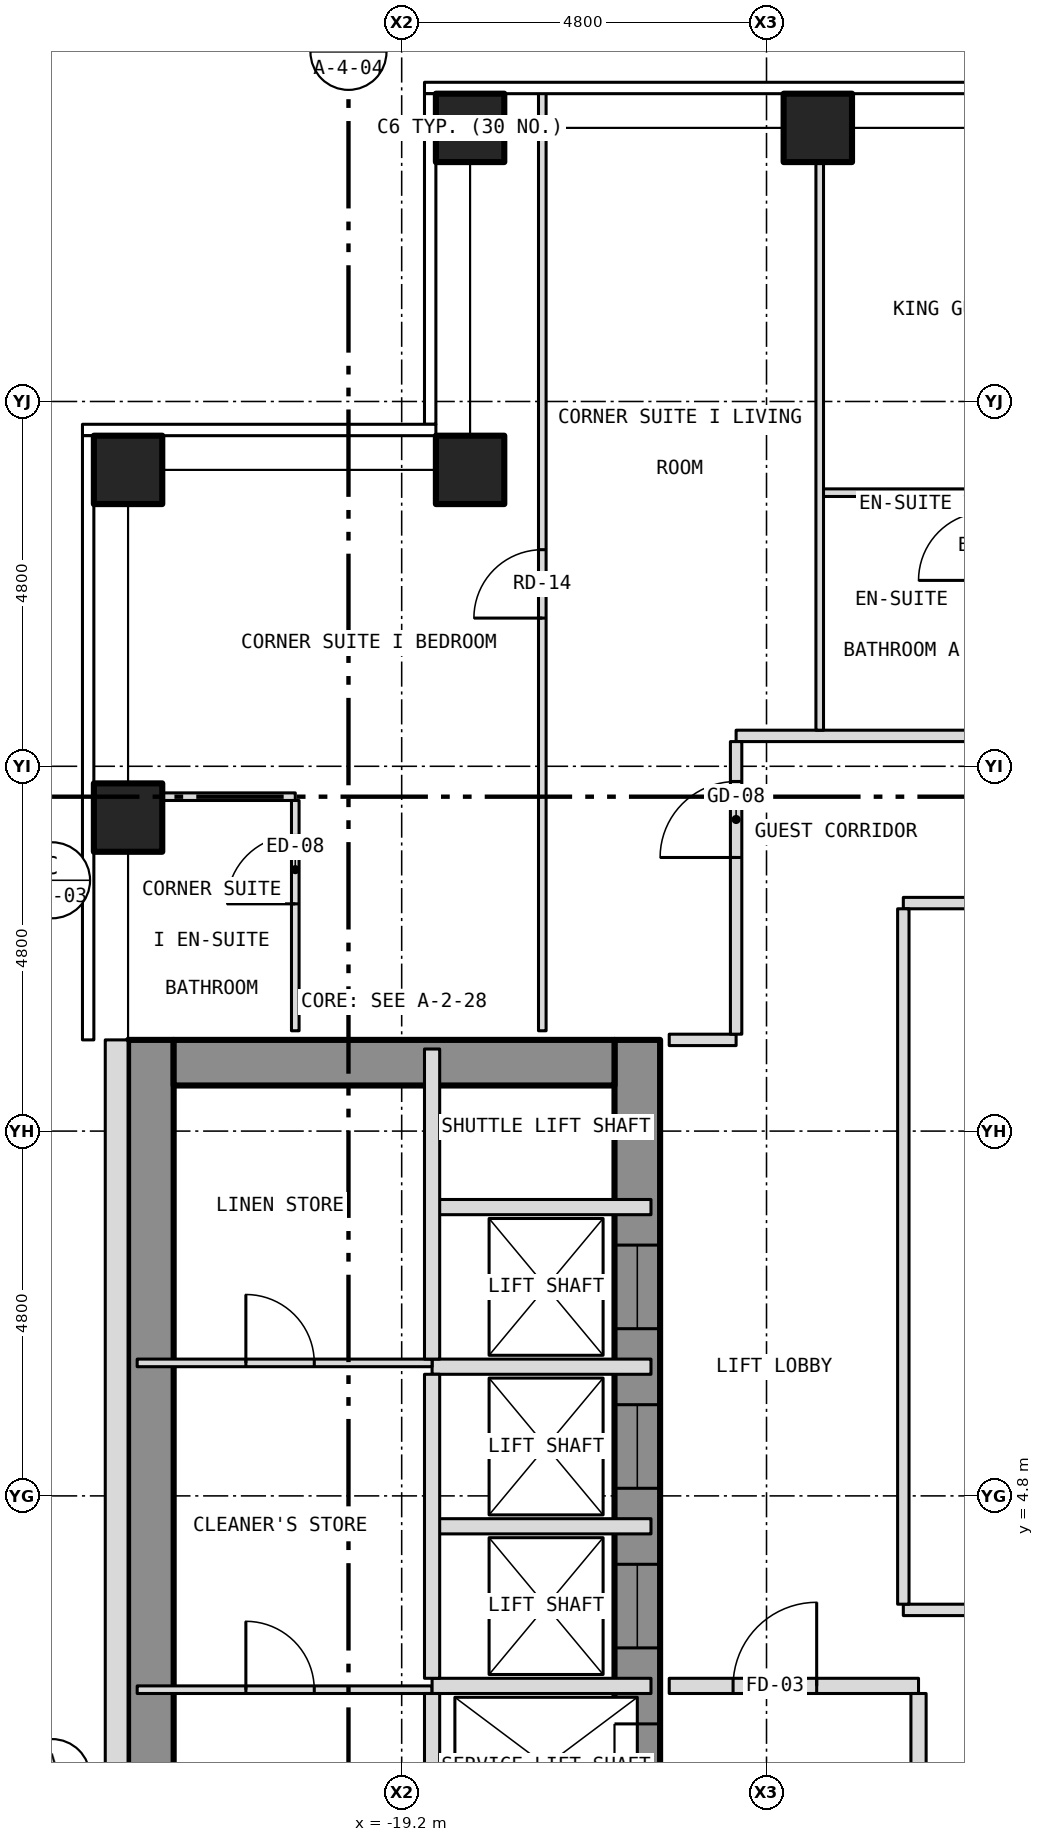
"""IFC4 building model, lengths in metres.
Left out: names, types, materials, properties, quantities, classifications, styles, units other than length and angle.
Written with IfcOpenShell. Run it as: python <this file> out.ifc"""

import sys

from ifc_helpers import new_model, si_unit, direction, frame, frame_2d, origin, origin_2d, place, context, subcontext, project, spatial, rectangle, hollow_rectangle, extrude, element, fill, save


model = new_model("IFC4")
c1 = context("Model", 3, precision=1e-05, world=origin(), true_north=direction((0.0, 1.0)))
c2 = subcontext(c1, "Body", "Model", "MODEL_VIEW")
j1 = project(units=[si_unit("LENGTHUNIT", "METRE"), si_unit("PLANEANGLEUNIT", "RADIAN")], contexts=[c1])
p1 = place(None, origin())
s1 = spatial("IfcSite", under=j1, at=p1, CompositionType="ELEMENT")
p2 = place(p1, origin())
s2 = spatial("IfcBuilding", under=s1, at=p2, CompositionType="ELEMENT")
p3 = place(p2, frame((0.0, 0.0, 103.0)))
s3 = spatial("IfcBuildingStorey", under=s2, at=p3, CompositionType="ELEMENT", Elevation=103.0)
for number, where, z_axis, x_axis in (
    (1, (-18.3, 22.8, -0.15), (0.0, 0.0, 1.0), (1.0, 0.0, 0.0)),
    (2, (-13.725, 22.8, -0.15), (0.0, 0.0, 1.0), (1.0, 0.0, 0.0)),
    (3, (-22.8, 13.725, -0.15), (0.0, 0.0, 1.0), (1.0, 0.0, 0.0)),
    (4, (-22.8, 18.3, -0.15), (0.0, 0.0, 1.0), (1.0, 0.0, 0.0)),
    (5, (-18.3, 18.3, -0.15), (0.0, 0.0, 1.0), (1.0, 0.0, 0.0)),
):
    element("IfcColumn", number, at=place(p3, frame(where, z_axis=z_axis, x_axis=x_axis)), inside=s3, PredefinedType="COLUMN", context=c2, shape_type="SweptSolid", body=[
        extrude(hollow_rectangle(XDim=0.9, YDim=0.9, WallThickness=0.05, at=origin_2d()), origin(), (0.0, 0.0, 1.0), 3.5),
    ])
p4 = place(p3, frame((-16.1, -10.8, 0.0), z_axis=(0.0, 0.0, 1.0), x_axis=(0.0, 1.0, 0.0)))
e6 = element("IfcWall", 6, at=p4, inside=s3, PredefinedType="SHEAR", context=c2, shape_type="SweptSolid", body=[
    extrude(rectangle(XDim=21.6, YDim=0.6, at=frame_2d((10.8, 0.0))), origin(), (0.0, 0.0, 1.0), 3.25),
])
p5 = place(p4, frame((9.4, 0.0, 0.0)))
e7 = element("IfcOpeningElement", 7, at=p5, cuts=e6, PredefinedType="OPENING", context=c2, shape_type="SweptSolid", body=[
    extrude(rectangle(XDim=1.1, YDim=2.1, at=frame_2d((0.55, 1.05))), frame((0.0, 0.312, 0.0), z_axis=(0.0, -1.0, 0.0), x_axis=(1.0, 0.0, 0.0)), (0.0, 0.0, 1.0), 0.624),
])
p6 = place(p4, frame((11.5, 0.0, 0.0)))
e8 = element("IfcOpeningElement", 8, at=p6, cuts=e6, PredefinedType="OPENING", context=c2, shape_type="SweptSolid", body=[
    extrude(rectangle(XDim=1.1, YDim=2.1, at=frame_2d((0.55, 1.05))), frame((0.0, 0.312, 0.0), z_axis=(0.0, -1.0, 0.0), x_axis=(1.0, 0.0, 0.0)), (0.0, 0.0, 1.0), 0.624),
])
p7 = place(p4, frame((13.6, 0.0, 0.0)))
e9 = element("IfcOpeningElement", 9, at=p7, cuts=e6, PredefinedType="OPENING", context=c2, shape_type="SweptSolid", body=[
    extrude(rectangle(XDim=1.1, YDim=2.1, at=frame_2d((0.55, 1.05))), frame((0.0, 0.312, 0.0), z_axis=(0.0, -1.0, 0.0), x_axis=(1.0, 0.0, 0.0)), (0.0, 0.0, 1.0), 0.624),
])
p8 = place(p4, frame((15.7, 0.0, 0.0)))
e10 = element("IfcOpeningElement", 10, at=p8, cuts=e6, PredefinedType="OPENING", context=c2, shape_type="SweptSolid", body=[
    extrude(rectangle(XDim=1.1, YDim=2.1, at=frame_2d((0.55, 1.05))), frame((0.0, 0.312, 0.0), z_axis=(0.0, -1.0, 0.0), x_axis=(1.0, 0.0, 0.0)), (0.0, 0.0, 1.0), 0.624),
])
p9 = place(p4, frame((17.8, 0.0, 0.0)))
e11 = element("IfcOpeningElement", 11, at=p9, cuts=e6, PredefinedType="OPENING", context=c2, shape_type="SweptSolid", body=[
    extrude(rectangle(XDim=1.1, YDim=2.1, at=frame_2d((0.55, 1.05))), frame((0.0, 0.312, 0.0), z_axis=(0.0, -1.0, 0.0), x_axis=(1.0, 0.0, 0.0)), (0.0, 0.0, 1.0), 0.624),
])
p10 = place(p4, frame((0.758, 0.0, 0.0)))
e12 = element("IfcOpeningElement", 12, at=p10, cuts=e6, PredefinedType="OPENING", context=c2, shape_type="SweptSolid", body=[
    extrude(rectangle(XDim=1.1, YDim=2.1, at=frame_2d((0.55, 1.05))), frame((0.0, 0.312, 0.0), z_axis=(0.0, -1.0, 0.0), x_axis=(1.0, 0.0, 0.0)), (0.0, 0.0, 1.0), 0.624),
])
p11 = place(p4, frame((7.5, 0.0, 0.0)))
e13 = element("IfcOpeningElement", 13, at=p11, cuts=e6, PredefinedType="OPENING", context=c2, shape_type="SweptSolid", body=[
    extrude(rectangle(XDim=1.1, YDim=2.1, at=frame_2d((0.55, 1.05))), frame((0.0, 0.312, 0.0), z_axis=(0.0, -1.0, 0.0), x_axis=(1.0, 0.0, 0.0)), (0.0, 0.0, 1.0), 0.624),
])
p12 = place(p3, frame((-22.5, -10.8, 0.0), z_axis=(0.0, 0.0, 1.0), x_axis=(0.0, 1.0, 0.0)))
e14 = element("IfcWall", 14, at=p12, inside=s3, PredefinedType="SHEAR", context=c2, shape_type="SweptSolid", body=[
    extrude(rectangle(XDim=21.6, YDim=0.6, at=frame_2d((10.8, 0.0))), origin(), (0.0, 0.0, 1.0), 3.25),
])
p13 = place(p3, frame((-22.2, 10.5, 0.0), z_axis=(0.0, 0.0, 1.0), x_axis=(1.0, 0.0, 0.0)))
e15 = element("IfcWall", 15, at=p13, inside=s3, PredefinedType="SHEAR", context=c2, shape_type="SweptSolid", body=[
    extrude(rectangle(XDim=5.8, YDim=0.6, at=frame_2d((2.9, 0.0))), origin(), (0.0, 0.0, 1.0), 3.25),
])
p14 = place(p3, frame((-22.95, 10.8, 0.0), z_axis=(0.0, 0.0, 1.0), x_axis=(0.0, -1.0, 0.0)))
e16 = element("IfcWall", 16, at=p14, inside=s3, PredefinedType="SOLIDWALL", context=c2, shape_type="SweptSolid", body=[
    extrude(rectangle(XDim=21.6, YDim=0.3, at=frame_2d((10.8, 0.0))), origin(), (0.0, 0.0, 1.0), 3.5),
])
p15 = place(p14, frame((18.05, 0.0, 1.0)))
e17 = element("IfcOpeningElement", 17, at=p15, cuts=e16, PredefinedType="OPENING", context=c2, shape_type="SweptSolid", body=[
    extrude(rectangle(XDim=0.6, YDim=1.5, at=frame_2d((0.3, 0.75))), frame((0.0, 0.162, 0.0), z_axis=(0.0, -1.0, 0.0), x_axis=(1.0, 0.0, 0.0)), (0.0, 0.0, 1.0), 0.324),
])
p16 = place(p3, frame((-22.68, 2.25, 0.0), z_axis=(0.0, 0.0, 1.0), x_axis=(1.0, 0.0, 0.0)))
e18 = element("IfcWall", 18, at=p16, inside=s3, PredefinedType="PARTITIONING", context=c2, shape_type="SweptSolid", body=[
    extrude(rectangle(XDim=3.88, YDim=0.1, at=frame_2d((1.94, 0.0))), origin(), (0.0, 0.0, 1.0), 3.25),
])
p17 = place(p16, frame((1.43, 0.0, 0.0)))
e19 = element("IfcOpeningElement", 19, at=p17, cuts=e18, PredefinedType="OPENING", context=c2, shape_type="SweptSolid", body=[
    extrude(rectangle(XDim=0.9, YDim=2.1, at=frame_2d((0.45, 1.05))), frame((0.0, 0.062, 0.0), z_axis=(0.0, -1.0, 0.0), x_axis=(1.0, 0.0, 0.0)), (0.0, 0.0, 1.0), 0.124),
])
p18 = place(p3, frame((-18.8, 2.3, 0.0), z_axis=(0.0, 0.0, 1.0), x_axis=(1.0, 0.0, 0.0)))
e20 = element("IfcWall", 20, at=p18, inside=s3, PredefinedType="PARTITIONING", context=c2, shape_type="SweptSolid", body=[
    extrude(rectangle(XDim=2.88, YDim=0.2, at=frame_2d((1.44, 0.0))), origin(), (0.0, 0.0, 1.0), 3.25),
])
p19 = place(p3, frame((-15.68, 2.3, 0.0), z_axis=(0.0, 0.0, 1.0), x_axis=(1.0, 0.0, 0.0)))
e21 = element("IfcWall", 21, at=p19, inside=s3, PredefinedType="PARTITIONING", context=c2, shape_type="SweptSolid", body=[
    extrude(rectangle(XDim=3.28, YDim=0.2, at=frame_2d((1.64, 0.0))), origin(), (0.0, 0.0, 1.0), 3.35),
])
p20 = place(p19, frame((0.84, 0.0, 0.0)))
e22 = element("IfcOpeningElement", 22, at=p20, cuts=e21, PredefinedType="OPENING", context=c2, shape_type="SweptSolid", body=[
    extrude(rectangle(XDim=1.1, YDim=2.1, at=frame_2d((0.55, 1.05))), frame((0.0, 0.112, 0.0), z_axis=(0.0, -1.0, 0.0), x_axis=(1.0, 0.0, 0.0)), (0.0, 0.0, 1.0), 0.224),
])
p21 = place(p3, frame((-12.6, 3.3, 0.0), z_axis=(0.0, 0.0, 1.0), x_axis=(1.0, 0.0, 0.0)))
e23 = element("IfcWall", 23, at=p21, inside=s3, PredefinedType="PARTITIONING", context=c2, shape_type="SweptSolid", body=[
    extrude(rectangle(XDim=25.2, YDim=0.15, at=frame_2d((12.6, 0.0))), origin(), (0.0, 0.0, 1.0), 3.35),
])
for number, where, z_axis, x_axis in (
    (24, (-18.8, 4.4, 0.0), (0.0, 0.0, 1.0), (1.0, 0.0, 0.0)),
    (25, (-18.8, 6.5, 0.0), (0.0, 0.0, 1.0), (1.0, 0.0, 0.0)),
):
    element("IfcWall", number, at=place(p3, frame(where, z_axis=z_axis, x_axis=x_axis)), inside=s3, PredefinedType="PARTITIONING", context=c2, shape_type="SweptSolid", body=[
        extrude(rectangle(XDim=2.88, YDim=0.2, at=frame_2d((1.44, 0.0))), origin(), (0.0, 0.0, 1.0), 3.25),
    ])
p22 = place(p3, frame((-22.68, 6.55, 0.0), z_axis=(0.0, 0.0, 1.0), x_axis=(1.0, 0.0, 0.0)))
e26 = element("IfcWall", 26, at=p22, inside=s3, PredefinedType="PARTITIONING", context=c2, shape_type="SweptSolid", body=[
    extrude(rectangle(XDim=3.88, YDim=0.1, at=frame_2d((1.94, 0.0))), origin(), (0.0, 0.0, 1.0), 3.25),
])
p23 = place(p22, frame((1.43, 0.0, 0.0)))
e27 = element("IfcOpeningElement", 27, at=p23, cuts=e26, PredefinedType="OPENING", context=c2, shape_type="SweptSolid", body=[
    extrude(rectangle(XDim=0.9, YDim=2.1, at=frame_2d((0.45, 1.05))), frame((0.0, 0.062, 0.0), z_axis=(0.0, -1.0, 0.0), x_axis=(1.0, 0.0, 0.0)), (0.0, 0.0, 1.0), 0.124),
])
p24 = place(p3, frame((-18.8, 8.6, 0.0), z_axis=(0.0, 0.0, 1.0), x_axis=(1.0, 0.0, 0.0)))
e28 = element("IfcWall", 28, at=p24, inside=s3, PredefinedType="PARTITIONING", context=c2, shape_type="SweptSolid", body=[
    extrude(rectangle(XDim=2.88, YDim=0.2, at=frame_2d((1.44, 0.0))), origin(), (0.0, 0.0, 1.0), 3.25),
])
p25 = place(p3, frame((-15.68, 10.8, 0.0), z_axis=(0.0, 0.0, 1.0), x_axis=(1.0, 0.0, 0.0)))
e29 = element("IfcWall", 29, at=p25, inside=s3, PredefinedType="PARTITIONING", context=c2, shape_type="SweptSolid", body=[
    extrude(rectangle(XDim=0.88, YDim=0.15, at=frame_2d((0.44, 0.0))), origin(), (0.0, 0.0, 1.0), 3.35),
])
p26 = place(p3, frame((-12.6, 12.6, 0.0), z_axis=(0.0, 0.0, 1.0), x_axis=(1.0, 0.0, 0.0)))
e30 = element("IfcWall", 30, at=p26, inside=s3, PredefinedType="PARTITIONING", context=c2, shape_type="SweptSolid", body=[
    extrude(rectangle(XDim=25.2, YDim=0.15, at=frame_2d((12.6, 0.0))), origin(), (0.0, 0.0, 1.0), 3.35),
])
p27 = place(p26, frame((5.85, 0.0, 0.0)))
e31 = element("IfcOpeningElement", 31, at=p27, cuts=e30, PredefinedType="OPENING", context=c2, shape_type="SweptSolid", body=[
    extrude(rectangle(XDim=0.9, YDim=2.1, at=frame_2d((0.45, 1.05))), frame((0.0, 0.087, 0.0), z_axis=(0.0, -1.0, 0.0), x_axis=(1.0, 0.0, 0.0)), (0.0, 0.0, 1.0), 0.174),
])
p28 = place(p26, frame((18.45, 0.0, 0.0)))
e32 = element("IfcOpeningElement", 32, at=p28, cuts=e30, PredefinedType="OPENING", context=c2, shape_type="SweptSolid", body=[
    extrude(rectangle(XDim=0.9, YDim=2.1, at=frame_2d((0.45, 1.05))), frame((0.0, 0.087, 0.0), z_axis=(0.0, -1.0, 0.0), x_axis=(1.0, 0.0, 0.0)), (0.0, 0.0, 1.0), 0.174),
])
p29 = place(p3, frame((-22.68, 14.0, 0.0), z_axis=(0.0, 0.0, 1.0), x_axis=(1.0, 0.0, 0.0)))
e33 = element("IfcWall", 33, at=p29, inside=s3, PredefinedType="PARTITIONING", context=c2, shape_type="SweptSolid", body=[
    extrude(rectangle(XDim=2.08, YDim=0.1, at=frame_2d((1.04, 0.0))), origin(), (0.0, 0.0, 1.0), 3.35),
])
p30 = place(p3, frame((-14.8, 14.8, 0.0), z_axis=(0.0, 0.0, 1.0), x_axis=(1.0, 0.0, 0.0)))
e34 = element("IfcWall", 34, at=p30, inside=s3, PredefinedType="PARTITIONING", context=c2, shape_type="SweptSolid", body=[
    extrude(rectangle(XDim=29.6, YDim=0.15, at=frame_2d((14.8, 0.0))), origin(), (0.0, 0.0, 1.0), 3.35),
])
p31 = place(p30, frame((3.963, 0.0, 0.0)))
e35 = element("IfcOpeningElement", 35, at=p31, cuts=e34, PredefinedType="OPENING", context=c2, shape_type="SweptSolid", body=[
    extrude(rectangle(XDim=1.0, YDim=2.1, at=frame_2d((0.5, 1.05))), frame((0.0, 0.087, 0.0), z_axis=(0.0, -1.0, 0.0), x_axis=(1.0, 0.0, 0.0)), (0.0, 0.0, 1.0), 0.174),
])
p32 = place(p30, frame((12.241, 0.0, 0.0)))
e36 = element("IfcOpeningElement", 36, at=p32, cuts=e34, PredefinedType="OPENING", context=c2, shape_type="SweptSolid", body=[
    extrude(rectangle(XDim=1.0, YDim=2.1, at=frame_2d((0.5, 1.05))), frame((0.0, 0.087, 0.0), z_axis=(0.0, -1.0, 0.0), x_axis=(1.0, 0.0, 0.0)), (0.0, 0.0, 1.0), 0.174),
])
p33 = place(p30, frame((21.213, 0.0, 0.0)))
e37 = element("IfcOpeningElement", 37, at=p33, cuts=e34, PredefinedType="OPENING", context=c2, shape_type="SweptSolid", body=[
    extrude(rectangle(XDim=0.9, YDim=2.1, at=frame_2d((0.45, 1.05))), frame((0.0, 0.087, 0.0), z_axis=(0.0, -1.0, 0.0), x_axis=(1.0, 0.0, 0.0)), (0.0, 0.0, 1.0), 0.174),
])
p34 = place(p3, frame((-13.7, 18.0, 0.0), z_axis=(0.0, 0.0, 1.0), x_axis=(1.0, 0.0, 0.0)))
e38 = element("IfcWall", 38, at=p34, inside=s3, PredefinedType="PARTITIONING", context=c2, shape_type="SweptSolid", body=[
    extrude(rectangle(XDim=2.2, YDim=0.1, at=frame_2d((1.1, 0.0))), origin(), (0.0, 0.0, 1.0), 3.35),
])
p35 = place(p3, frame((-20.6, 10.92, 0.0), z_axis=(0.0, 0.0, 1.0), x_axis=(0.0, 1.0, 0.0)))
e39 = element("IfcWall", 39, at=p35, inside=s3, PredefinedType="PARTITIONING", context=c2, shape_type="SweptSolid", body=[
    extrude(rectangle(XDim=3.03, YDim=0.1, at=frame_2d((1.515, 0.0))), origin(), (0.0, 0.0, 1.0), 3.35),
])
p36 = place(p35, frame((1.67, 0.0, 0.0)))
e40 = element("IfcOpeningElement", 40, at=p36, cuts=e39, PredefinedType="OPENING", context=c2, shape_type="SweptSolid", body=[
    extrude(rectangle(XDim=0.9, YDim=2.1, at=frame_2d((0.45, 1.05))), frame((0.0, 0.062, 0.0), z_axis=(0.0, -1.0, 0.0), x_axis=(1.0, 0.0, 0.0)), (0.0, 0.0, 1.0), 0.124),
])
for number, where, z_axis, x_axis in (
    (41, (-18.8, -1.8, 0.0), (0.0, 0.0, 1.0), (0.0, 1.0, 0.0)),
    (42, (-18.8, 2.4, 0.0), (0.0, 0.0, 1.0), (0.0, 1.0, 0.0)),
):
    element("IfcWall", number, at=place(p3, frame(where, z_axis=z_axis, x_axis=x_axis)), inside=s3, PredefinedType="PARTITIONING", context=c2, shape_type="SweptSolid", body=[
        extrude(rectangle(XDim=4.0, YDim=0.2, at=frame_2d((2.0, 0.0))), origin(), (0.0, 0.0, 1.0), 3.25),
    ])
p37 = place(p3, frame((-18.8, 6.6, 0.0), z_axis=(0.0, 0.0, 1.0), x_axis=(0.0, 1.0, 0.0)))
e43 = element("IfcWall", 43, at=p37, inside=s3, PredefinedType="PARTITIONING", context=c2, shape_type="SweptSolid", body=[
    extrude(rectangle(XDim=4.08, YDim=0.2, at=frame_2d((2.04, 0.0))), origin(), (0.0, 0.0, 1.0), 3.25),
])
p38 = place(p3, frame((-17.35, 10.92, 0.0), z_axis=(0.0, 0.0, 1.0), x_axis=(0.0, 1.0, 0.0)))
e44 = element("IfcWall", 44, at=p38, inside=s3, PredefinedType="PARTITIONING", context=c2, shape_type="SweptSolid", body=[
    extrude(rectangle(XDim=12.36, YDim=0.1, at=frame_2d((6.18, 0.0))), origin(), (0.0, 0.0, 1.0), 3.35),
])
p39 = place(p38, frame((5.43, 0.0, 0.0)))
e45 = element("IfcOpeningElement", 45, at=p39, cuts=e44, PredefinedType="OPENING", context=c2, shape_type="SweptSolid", body=[
    extrude(rectangle(XDim=0.9, YDim=2.1, at=frame_2d((0.45, 1.05))), frame((0.0, 0.062, 0.0), z_axis=(0.0, -1.0, 0.0), x_axis=(1.0, 0.0, 0.0)), (0.0, 0.0, 1.0), 0.124),
])
p40 = place(p3, frame((-14.8, 10.875, 0.0), z_axis=(0.0, 0.0, 1.0), x_axis=(0.0, 1.0, 0.0)))
e46 = element("IfcWall", 46, at=p40, inside=s3, PredefinedType="PARTITIONING", context=c2, shape_type="SweptSolid", body=[
    extrude(rectangle(XDim=3.85, YDim=0.15, at=frame_2d((1.925, 0.0))), origin(), (0.0, 0.0, 1.0), 3.35),
])
p41 = place(p40, frame((2.325, 0.0, 0.0)))
e47 = element("IfcOpeningElement", 47, at=p41, cuts=e46, PredefinedType="OPENING", context=c2, shape_type="SweptSolid", body=[
    extrude(rectangle(XDim=1.0, YDim=2.1, at=frame_2d((0.5, 1.05))), frame((0.0, 0.087, 0.0), z_axis=(0.0, -1.0, 0.0), x_axis=(1.0, 0.0, 0.0)), (0.0, 0.0, 1.0), 0.174),
])
p42 = place(p3, frame((-13.7, 14.875, 0.0), z_axis=(0.0, 0.0, 1.0), x_axis=(0.0, 1.0, 0.0)))
e48 = element("IfcWall", 48, at=p42, inside=s3, PredefinedType="PARTITIONING", context=c2, shape_type="SweptSolid", body=[
    extrude(rectangle(XDim=7.805, YDim=0.1, at=frame_2d((3.902, 0.0))), origin(), (0.0, 0.0, 1.0), 3.35),
])
p43 = place(p3, frame((-12.6, 3.375, 0.0), z_axis=(0.0, 0.0, 1.0), x_axis=(0.0, 1.0, 0.0)))
e49 = element("IfcWall", 49, at=p43, inside=s3, PredefinedType="PARTITIONING", context=c2, shape_type="SweptSolid", body=[
    extrude(rectangle(XDim=9.15, YDim=0.15, at=frame_2d((4.575, 0.0))), origin(), (0.0, 0.0, 1.0), 3.35),
])
p44 = place(p3, frame((-12.4, -1.8, 0.0), z_axis=(0.0, 0.0, 1.0), x_axis=(0.0, 1.0, 0.0)))
e50 = element("IfcWall", 50, at=p44, inside=s3, PredefinedType="PARTITIONING", context=c2, shape_type="SweptSolid", body=[
    extrude(rectangle(XDim=4.0, YDim=0.2, at=frame_2d((2.0, 0.0))), origin(), (0.0, 0.0, 1.0), 3.35),
])
p45 = place(p6, origin())
e51 = element("IfcDoor", 51, at=p45, inside=s3, OperationType="SLIDING_TO_LEFT", PredefinedType="DOOR", context=c2, shape_type="SweptSolid", body=[
    extrude(rectangle(XDim=1.1, YDim=2.1, at=frame_2d((0.55, 1.05))), frame((0.0, 0.025, 0.0), z_axis=(0.0, -1.0, 0.0), x_axis=(1.0, 0.0, 0.0)), (0.0, 0.0, 1.0), 0.05),
])
fill(e8, e51)
p46 = place(p7, origin())
e52 = element("IfcDoor", 52, at=p46, inside=s3, OperationType="SLIDING_TO_LEFT", PredefinedType="DOOR", context=c2, shape_type="SweptSolid", body=[
    extrude(rectangle(XDim=1.1, YDim=2.1, at=frame_2d((0.55, 1.05))), frame((0.0, 0.025, 0.0), z_axis=(0.0, -1.0, 0.0), x_axis=(1.0, 0.0, 0.0)), (0.0, 0.0, 1.0), 0.05),
])
fill(e9, e52)
p47 = place(p8, origin())
e53 = element("IfcDoor", 53, at=p47, inside=s3, OperationType="SLIDING_TO_LEFT", PredefinedType="DOOR", context=c2, shape_type="SweptSolid", body=[
    extrude(rectangle(XDim=1.1, YDim=2.1, at=frame_2d((0.55, 1.05))), frame((0.0, 0.025, 0.0), z_axis=(0.0, -1.0, 0.0), x_axis=(1.0, 0.0, 0.0)), (0.0, 0.0, 1.0), 0.05),
])
fill(e10, e53)
p48 = place(p9, origin())
e54 = element("IfcDoor", 54, at=p48, inside=s3, OperationType="SLIDING_TO_LEFT", PredefinedType="DOOR", context=c2, shape_type="SweptSolid", body=[
    extrude(rectangle(XDim=1.1, YDim=2.1, at=frame_2d((0.55, 1.05))), frame((0.0, 0.025, 0.0), z_axis=(0.0, -1.0, 0.0), x_axis=(1.0, 0.0, 0.0)), (0.0, 0.0, 1.0), 0.05),
])
fill(e11, e54)
p49 = place(p17, origin())
e55 = element("IfcDoor", 55, at=p49, inside=s3, OperationType="SINGLE_SWING_LEFT", PredefinedType="DOOR", context=c2, shape_type="SweptSolid", body=[
    extrude(rectangle(XDim=0.9, YDim=2.1, at=frame_2d((0.45, 1.05))), frame((0.0, 0.025, 0.0), z_axis=(0.0, -1.0, 0.0), x_axis=(1.0, 0.0, 0.0)), (0.0, 0.0, 1.0), 0.05),
])
fill(e19, e55)
p50 = place(p23, origin())
e56 = element("IfcDoor", 56, at=p50, inside=s3, OperationType="SINGLE_SWING_LEFT", PredefinedType="DOOR", context=c2, shape_type="SweptSolid", body=[
    extrude(rectangle(XDim=0.9, YDim=2.1, at=frame_2d((0.45, 1.05))), frame((0.0, 0.025, 0.0), z_axis=(0.0, -1.0, 0.0), x_axis=(1.0, 0.0, 0.0)), (0.0, 0.0, 1.0), 0.05),
])
fill(e27, e56)
p51 = place(p20, origin())
e57 = element("IfcDoor", 57, at=p51, inside=s3, OperationType="SINGLE_SWING_RIGHT", PredefinedType="DOOR", context=c2, shape_type="SweptSolid", body=[
    extrude(rectangle(XDim=1.1, YDim=2.1, at=frame_2d((0.55, 1.05))), frame((0.0, 0.025, 0.0), z_axis=(0.0, -1.0, 0.0), x_axis=(1.0, 0.0, 0.0)), (0.0, 0.0, 1.0), 0.05),
])
fill(e22, e57)
p52 = place(p41, origin())
e58 = element("IfcDoor", 58, at=p52, inside=s3, OperationType="SINGLE_SWING_LEFT", PredefinedType="DOOR", context=c2, shape_type="SweptSolid", body=[
    extrude(rectangle(XDim=1.0, YDim=2.1, at=frame_2d((0.5, 1.05))), frame((0.0, 0.025, 0.0), z_axis=(0.0, -1.0, 0.0), x_axis=(1.0, 0.0, 0.0)), (0.0, 0.0, 1.0), 0.05),
])
fill(e47, e58)
p53 = place(p39, origin())
e59 = element("IfcDoor", 59, at=p53, inside=s3, OperationType="SINGLE_SWING_LEFT", PredefinedType="DOOR", context=c2, shape_type="SweptSolid", body=[
    extrude(rectangle(XDim=0.9, YDim=2.1, at=frame_2d((0.45, 1.05))), frame((0.0, 0.025, 0.0), z_axis=(0.0, -1.0, 0.0), x_axis=(1.0, 0.0, 0.0)), (0.0, 0.0, 1.0), 0.05),
])
fill(e45, e59)
p54 = place(p36, origin())
e60 = element("IfcDoor", 60, at=p54, inside=s3, OperationType="SINGLE_SWING_LEFT", PredefinedType="DOOR", context=c2, shape_type="SweptSolid", body=[
    extrude(rectangle(XDim=0.9, YDim=2.1, at=frame_2d((0.45, 1.05))), frame((0.0, 0.025, 0.0), z_axis=(0.0, -1.0, 0.0), x_axis=(1.0, 0.0, 0.0)), (0.0, 0.0, 1.0), 0.05),
])
fill(e40, e60)
save(model, sys.argv[1])
